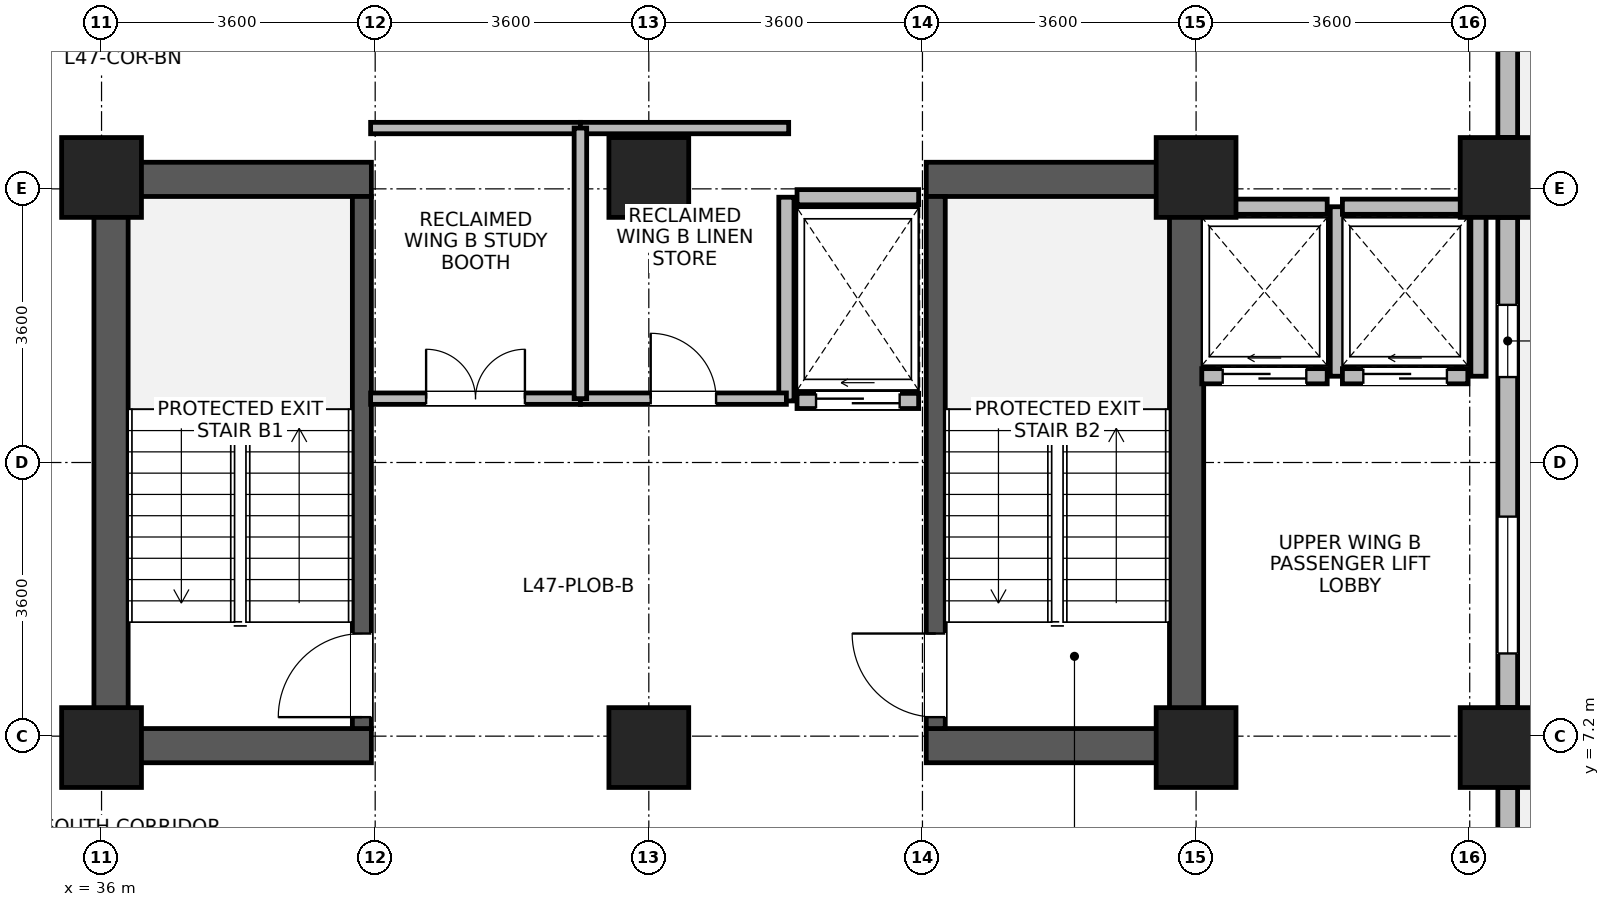
"""IFC4 building model, lengths in metres.
Left out: names, types, materials, properties, quantities, classifications, styles, units other than length and angle.
Written with IfcOpenShell. Run it as: python <this file> out.ifc"""

import sys

from ifc_helpers import new_model, si_unit, direction, frame, frame_2d, origin, origin_2d, place, context, subcontext, project, spatial, rectangle, extrude, source, transform, mapped, element, fill, save


model = new_model("IFC4")
c1 = context("Model", 3, precision=1e-05, world=origin(), true_north=direction((0.0, 1.0)))
c2 = subcontext(c1, "Body", "Model", "MODEL_VIEW")
j1 = project(units=[si_unit("LENGTHUNIT", "METRE"), si_unit("PLANEANGLEUNIT", "RADIAN")], contexts=[c1])
p1 = place(None, origin())
s1 = spatial("IfcSite", under=j1, at=p1, CompositionType="ELEMENT")
p2 = place(p1, origin())
s2 = spatial("IfcBuilding", under=s1, at=p2, CompositionType="ELEMENT")
p3 = place(p2, frame((0.0, 0.0, 184.6)))
s3 = spatial("IfcBuildingStorey", under=s2, at=p3, CompositionType="ELEMENT", Elevation=184.6)
for number, where, z_axis, x_axis in (
    (1, (36.125, 6.85, 0.0), (0.0, 0.0, 1.0), (0.0, 1.0, 0.0)),
    (2, (50.275, 6.85, 0.0), (0.0, 0.0, 1.0), (0.0, 1.0, 0.0)),
):
    element("IfcWall", number, at=place(p3, frame(where, z_axis=z_axis, x_axis=x_axis)), inside=s3, PredefinedType="SHEAR", context=c2, shape_type="SweptSolid", body=[
        extrude(rectangle(XDim=7.9, YDim=0.45, at=frame_2d((3.95, 0.0))), origin(), (0.0, 0.0, 1.0), 3.46),
    ])
for number, where, z_axis, x_axis in (
    (3, (36.35, 7.075, 0.0), (0.0, 0.0, 1.0), (1.0, 0.0, 0.0)),
    (4, (46.85, 7.075, 0.0), (0.0, 0.0, 1.0), (1.0, 0.0, 0.0)),
    (5, (36.35, 14.525, 0.0), (0.0, 0.0, 1.0), (1.0, 0.0, 0.0)),
    (6, (46.85, 14.525, 0.0), (0.0, 0.0, 1.0), (1.0, 0.0, 0.0)),
):
    element("IfcWall", number, at=place(p3, frame(where, z_axis=z_axis, x_axis=x_axis)), inside=s3, PredefinedType="SHEAR", context=c2, shape_type="SweptSolid", body=[
        extrude(rectangle(XDim=3.2, YDim=0.45, at=frame_2d((1.6, 0.0))), origin(), (0.0, 0.0, 1.0), 3.46),
    ])
p4 = place(p3, frame((39.425, 7.3, 0.0), z_axis=(0.0, 0.0, 1.0), x_axis=(0.0, 1.0, 0.0)))
e7 = element("IfcWall", 7, at=p4, inside=s3, PredefinedType="SHEAR", context=c2, shape_type="SweptSolid", body=[
    extrude(rectangle(XDim=7.0, YDim=0.25, at=frame_2d((3.5, 0.0))), origin(), (0.0, 0.0, 1.0), 3.46),
])
p5 = place(p4, frame((0.15, 0.0, 0.0)))
e8 = element("IfcOpeningElement", 8, at=p5, cuts=e7, PredefinedType="OPENING", context=c2, shape_type="SweptSolid", body=[
    extrude(rectangle(XDim=1.1, YDim=2.08, at=frame_2d((0.55, 1.04))), frame((0.0, 0.135, 0.0), z_axis=(0.0, -1.0, 0.0), x_axis=(1.0, 0.0, 0.0)), (0.0, 0.0, 1.0), 0.27),
])
p6 = place(p3, frame((46.975, 7.3, 0.0), z_axis=(0.0, 0.0, 1.0), x_axis=(0.0, 1.0, 0.0)))
e9 = element("IfcWall", 9, at=p6, inside=s3, PredefinedType="SHEAR", context=c2, shape_type="SweptSolid", body=[
    extrude(rectangle(XDim=7.0, YDim=0.25, at=frame_2d((3.5, 0.0))), origin(), (0.0, 0.0, 1.0), 3.46),
])
p7 = place(p6, frame((0.15, 0.0, 0.0)))
e10 = element("IfcOpeningElement", 10, at=p7, cuts=e9, PredefinedType="OPENING", context=c2, shape_type="SweptSolid", body=[
    extrude(rectangle(XDim=1.1, YDim=2.08, at=frame_2d((0.55, 1.04))), frame((0.0, 0.135, 0.0), z_axis=(0.0, -1.0, 0.0), x_axis=(1.0, 0.0, 0.0)), (0.0, 0.0, 1.0), 0.27),
])
m1 = source(origin(), c2, "Body", "SweptSolid", [
    extrude(rectangle(XDim=1.05, YDim=1.05, at=origin_2d()), origin(), (0.0, 0.0, 1.0), 3.7),
])
for number, where, z_axis, x_axis in (
    (11, (36.0, 7.05, 0.0), (0.0, 0.0, 1.0), (1.0, 0.0, 0.0)),
    (12, (36.0, 14.55, 0.0), (0.0, 0.0, 1.0), (1.0, 0.0, 0.0)),
    (13, (43.2, 7.05, 0.0), (0.0, 0.0, 1.0), (1.0, 0.0, 0.0)),
    (14, (43.2, 14.55, 0.0), (0.0, 0.0, 1.0), (1.0, 0.0, 0.0)),
    (15, (50.4, 7.05, 0.0), (0.0, 0.0, 1.0), (1.0, 0.0, 0.0)),
    (16, (50.4, 14.55, 0.0), (0.0, 0.0, 1.0), (1.0, 0.0, 0.0)),
    (17, (54.4, 7.05, 0.0), (0.0, 0.0, 1.0), (1.0, 0.0, 0.0)),
    (18, (54.4, 14.55, 0.0), (0.0, 0.0, 1.0), (1.0, 0.0, 0.0)),
):
    element("IfcColumn", number, at=place(p3, frame(where, z_axis=z_axis, x_axis=x_axis)), inside=s3, PredefinedType="COLUMN", context=c2, shape_type="MappedRepresentation", body=[
        mapped(m1, transform((0.0, 0.0, 0.0), x_axis=(1.0, 0.0, 0.0), y_axis=(0.0, 1.0, 0.0), z_axis=(0.0, 0.0, 1.0), scale=1.0)),
    ])
p8 = place(p3, frame((54.5, 6.524, 0.0), z_axis=(0.0, 0.0, 1.0), x_axis=(0.0, -1.0, 0.0)))
e19 = element("IfcWall", 19, at=p8, inside=s3, PredefinedType="STANDARD", context=c2, shape_type="SweptSolid", body=[
    extrude(rectangle(XDim=4.854, YDim=0.26, at=frame_2d((2.427, 0.0))), origin(), (0.0, 0.0, 1.0), 3.44),
])
p9 = place(p8, frame((2.648, 0.0, 0.0)))
e20 = element("IfcOpeningElement", 20, at=p9, cuts=e19, PredefinedType="OPENING", context=c2, shape_type="SweptSolid", body=[
    extrude(rectangle(XDim=1.5, YDim=2.15, at=frame_2d((0.75, 1.075))), frame((0.0, 0.14, 0.0), z_axis=(0.0, -1.0, 0.0), x_axis=(1.0, 0.0, 0.0)), (0.0, 0.0, 1.0), 0.28),
])
p10 = place(p3, frame((54.5, 14.024, 0.0), z_axis=(0.0, 0.0, 1.0), x_axis=(0.0, -1.0, 0.0)))
e21 = element("IfcWall", 21, at=p10, inside=s3, PredefinedType="STANDARD", context=c2, shape_type="SweptSolid", body=[
    extrude(rectangle(XDim=6.448, YDim=0.26, at=frame_2d((3.224, 0.0))), origin(), (0.0, 0.0, 1.0), 2.99),
])
p11 = place(p10, frame((3.936, 0.0, 0.85)))
e22 = element("IfcOpeningElement", 22, at=p11, cuts=e21, PredefinedType="OPENING", context=c2, shape_type="SweptSolid", body=[
    extrude(rectangle(XDim=1.8, YDim=1.85, at=frame_2d((0.9, 0.925))), frame((0.0, 0.14, 0.0), z_axis=(0.0, -1.0, 0.0), x_axis=(1.0, 0.0, 0.0)), (0.0, 0.0, 1.0), 0.28),
])
p12 = place(p10, frame((1.15, 0.0, 0.85)))
e23 = element("IfcOpeningElement", 23, at=p12, cuts=e21, PredefinedType="OPENING", context=c2, shape_type="SweptSolid", body=[
    extrude(rectangle(XDim=0.95, YDim=1.75, at=frame_2d((0.475, 0.875))), frame((0.0, 0.14, 0.0), z_axis=(0.0, -1.0, 0.0), x_axis=(1.0, 0.0, 0.0)), (0.0, 0.0, 1.0), 0.28),
])
p13 = place(p3, frame((54.5, 21.074, 0.0), z_axis=(0.0, 0.0, 1.0), x_axis=(0.0, -1.0, 0.0)))
e24 = element("IfcWall", 24, at=p13, inside=s3, PredefinedType="STANDARD", context=c2, shape_type="SweptSolid", body=[
    extrude(rectangle(XDim=5.998, YDim=0.26, at=frame_2d((2.999, 0.0))), origin(), (0.0, 0.0, 1.0), 2.99),
])
p14 = place(p13, frame((0.6, 0.0, 0.85)))
e25 = element("IfcOpeningElement", 25, at=p14, cuts=e24, PredefinedType="OPENING", context=c2, shape_type="SweptSolid", body=[
    extrude(rectangle(XDim=1.8, YDim=1.85, at=frame_2d((0.9, 0.925))), frame((0.0, 0.14, 0.0), z_axis=(0.0, -1.0, 0.0), x_axis=(1.0, 0.0, 0.0)), (0.0, 0.0, 1.0), 0.28),
])
p15 = place(p3, frame((50.475, 11.935, 0.0), z_axis=(0.0, 0.0, 1.0), x_axis=(1.0, 0.0, 0.0)))
e26 = element("IfcWall", 26, at=p15, inside=s3, PredefinedType="PARTITIONING", context=c2, shape_type="SweptSolid", body=[
    extrude(rectangle(XDim=1.65, YDim=0.2, at=frame_2d((0.825, 0.0))), origin(), (0.0, 0.0, 1.0), 3.44),
])
p16 = place(p15, frame((0.275, 0.0, 0.0)))
e27 = element("IfcOpeningElement", 27, at=p16, cuts=e26, PredefinedType="OPENING", context=c2, shape_type="SweptSolid", body=[
    extrude(rectangle(XDim=1.1, YDim=2.12, at=frame_2d((0.55, 1.06))), frame((0.0, 0.11, 0.0), z_axis=(0.0, -1.0, 0.0), x_axis=(1.0, 0.0, 0.0)), (0.0, 0.0, 1.0), 0.22),
])
p17 = place(p3, frame((50.475, 14.165, 0.0), z_axis=(0.0, 0.0, 1.0), x_axis=(1.0, 0.0, 0.0)))
e28 = element("IfcWall", 28, at=p17, inside=s3, PredefinedType="PARTITIONING", context=c2, shape_type="SweptSolid", body=[
    extrude(rectangle(XDim=1.65, YDim=0.2, at=frame_2d((0.825, 0.0))), origin(), (0.0, 0.0, 1.0), 3.44),
])
p18 = place(p3, frame((52.265, 11.935, 0.0), z_axis=(0.0, 0.0, 1.0), x_axis=(0.0, 1.0, 0.0)))
e29 = element("IfcWall", 29, at=p18, inside=s3, PredefinedType="PARTITIONING", context=c2, shape_type="SweptSolid", body=[
    extrude(rectangle(XDim=2.23, YDim=0.2, at=frame_2d((1.115, 0.0))), origin(), (0.0, 0.0, 1.0), 3.44),
])
p19 = place(p3, frame((52.325, 11.935, 0.0), z_axis=(0.0, 0.0, 1.0), x_axis=(1.0, 0.0, 0.0)))
e30 = element("IfcWall", 30, at=p19, inside=s3, PredefinedType="PARTITIONING", context=c2, shape_type="SweptSolid", body=[
    extrude(rectangle(XDim=1.65, YDim=0.2, at=frame_2d((0.825, 0.0))), origin(), (0.0, 0.0, 1.0), 3.44),
])
p20 = place(p19, frame((0.275, 0.0, 0.0)))
e31 = element("IfcOpeningElement", 31, at=p20, cuts=e30, PredefinedType="OPENING", context=c2, shape_type="SweptSolid", body=[
    extrude(rectangle(XDim=1.1, YDim=2.12, at=frame_2d((0.55, 1.06))), frame((0.0, 0.11, 0.0), z_axis=(0.0, -1.0, 0.0), x_axis=(1.0, 0.0, 0.0)), (0.0, 0.0, 1.0), 0.22),
])
p21 = place(p3, frame((52.325, 14.165, 0.0), z_axis=(0.0, 0.0, 1.0), x_axis=(1.0, 0.0, 0.0)))
e32 = element("IfcWall", 32, at=p21, inside=s3, PredefinedType="PARTITIONING", context=c2, shape_type="SweptSolid", body=[
    extrude(rectangle(XDim=1.65, YDim=0.2, at=frame_2d((0.825, 0.0))), origin(), (0.0, 0.0, 1.0), 3.44),
])
p22 = place(p3, frame((54.115, 11.935, 0.0), z_axis=(0.0, 0.0, 1.0), x_axis=(0.0, 1.0, 0.0)))
e33 = element("IfcWall", 33, at=p22, inside=s3, PredefinedType="PARTITIONING", context=c2, shape_type="SweptSolid", body=[
    extrude(rectangle(XDim=2.23, YDim=0.2, at=frame_2d((1.115, 0.0))), origin(), (0.0, 0.0, 1.0), 2.99),
])
p23 = place(p3, frame((45.15, 11.61, 0.0), z_axis=(0.0, 0.0, 1.0), x_axis=(1.0, 0.0, 0.0)))
e34 = element("IfcWall", 34, at=p23, inside=s3, PredefinedType="PARTITIONING", context=c2, shape_type="SweptSolid", body=[
    extrude(rectangle(XDim=1.6, YDim=0.2, at=frame_2d((0.8, 0.0))), origin(), (0.0, 0.0, 1.0), 3.44),
])
p24 = place(p23, frame((0.25, 0.0, 0.0)))
e35 = element("IfcOpeningElement", 35, at=p24, cuts=e34, PredefinedType="OPENING", context=c2, shape_type="SweptSolid", body=[
    extrude(rectangle(XDim=1.1, YDim=2.12, at=frame_2d((0.55, 1.06))), frame((0.0, 0.11, 0.0), z_axis=(0.0, -1.0, 0.0), x_axis=(1.0, 0.0, 0.0)), (0.0, 0.0, 1.0), 0.22),
])
p25 = place(p3, frame((45.15, 14.29, 0.0), z_axis=(0.0, 0.0, 1.0), x_axis=(1.0, 0.0, 0.0)))
e36 = element("IfcWall", 36, at=p25, inside=s3, PredefinedType="PARTITIONING", context=c2, shape_type="SweptSolid", body=[
    extrude(rectangle(XDim=1.6, YDim=0.2, at=frame_2d((0.8, 0.0))), origin(), (0.0, 0.0, 1.0), 2.44),
])
p26 = place(p3, frame((45.01, 11.61, 0.0), z_axis=(0.0, 0.0, 1.0), x_axis=(0.0, 1.0, 0.0)))
e37 = element("IfcWall", 37, at=p26, inside=s3, PredefinedType="PARTITIONING", context=c2, shape_type="SweptSolid", body=[
    extrude(rectangle(XDim=2.68, YDim=0.2, at=frame_2d((1.34, 0.0))), origin(), (0.0, 0.0, 1.0), 3.44),
])
p27 = place(p3, frame((39.54, 11.64, 0.0), z_axis=(0.0, 0.0, 1.0), x_axis=(1.0, 0.0, 0.0)))
e38 = element("IfcWall", 38, at=p27, inside=s3, PredefinedType="PARTITIONING", context=c2, shape_type="SweptSolid", body=[
    extrude(rectangle(XDim=2.76, YDim=0.15, at=frame_2d((1.38, 0.0))), origin(), (0.0, 0.0, 1.0), 3.44),
])
p28 = place(p27, frame((0.73, 0.0, 0.0)))
e39 = element("IfcOpeningElement", 39, at=p28, cuts=e38, PredefinedType="OPENING", context=c2, shape_type="SweptSolid", body=[
    extrude(rectangle(XDim=1.3, YDim=2.12, at=frame_2d((0.65, 1.06))), frame((0.0, 0.085, 0.0), z_axis=(0.0, -1.0, 0.0), x_axis=(1.0, 0.0, 0.0)), (0.0, 0.0, 1.0), 0.17),
])
p29 = place(p3, frame((39.54, 15.2, 0.0), z_axis=(0.0, 0.0, 1.0), x_axis=(1.0, 0.0, 0.0)))
e40 = element("IfcWall", 40, at=p29, inside=s3, PredefinedType="PARTITIONING", context=c2, shape_type="SweptSolid", body=[
    extrude(rectangle(XDim=2.76, YDim=0.15, at=frame_2d((1.38, 0.0))), origin(), (0.0, 0.0, 1.0), 3.44),
])
p30 = place(p3, frame((42.3, 11.64, 0.0), z_axis=(0.0, 0.0, 1.0), x_axis=(1.0, 0.0, 0.0)))
e41 = element("IfcWall", 41, at=p30, inside=s3, PredefinedType="PARTITIONING", context=c2, shape_type="SweptSolid", body=[
    extrude(rectangle(XDim=2.71, YDim=0.15, at=frame_2d((1.355, 0.0))), origin(), (0.0, 0.0, 1.0), 3.44),
])
p31 = place(p30, frame((0.925, 0.0, 0.0)))
e42 = element("IfcOpeningElement", 42, at=p31, cuts=e41, PredefinedType="OPENING", context=c2, shape_type="SweptSolid", body=[
    extrude(rectangle(XDim=0.86, YDim=2.02, at=frame_2d((0.43, 1.01))), frame((0.0, 0.085, 0.0), z_axis=(0.0, -1.0, 0.0), x_axis=(1.0, 0.0, 0.0)), (0.0, 0.0, 1.0), 0.17),
])
p32 = place(p3, frame((42.3, 15.2, 0.0), z_axis=(0.0, 0.0, 1.0), x_axis=(1.0, 0.0, 0.0)))
e43 = element("IfcWall", 43, at=p32, inside=s3, PredefinedType="PARTITIONING", context=c2, shape_type="SweptSolid", body=[
    extrude(rectangle(XDim=2.74, YDim=0.15, at=frame_2d((1.37, 0.0))), origin(), (0.0, 0.0, 1.0), 3.44),
])
p33 = place(p3, frame((42.3, 11.64, 0.0), z_axis=(0.0, 0.0, 1.0), x_axis=(0.0, 1.0, 0.0)))
e44 = element("IfcWall", 44, at=p33, inside=s3, PredefinedType="PARTITIONING", context=c2, shape_type="SweptSolid", body=[
    extrude(rectangle(XDim=3.56, YDim=0.165, at=frame_2d((1.78, 0.0))), origin(), (0.0, 0.0, 1.0), 3.44),
])
p34 = place(p11, origin())
e45 = element("IfcWindow", 45, at=p34, inside=s3, PartitioningType="SINGLE_PANEL", PredefinedType="WINDOW", context=c2, shape_type="SweptSolid", body=[
    extrude(rectangle(XDim=1.8, YDim=1.85, at=frame_2d((0.9, 0.925))), frame((0.0, 0.03, 0.0), z_axis=(0.0, -1.0, 0.0), x_axis=(1.0, 0.0, 0.0)), (0.0, 0.0, 1.0), 0.06),
])
fill(e22, e45)
p35 = place(p12, origin())
e46 = element("IfcWindow", 46, at=p35, inside=s3, PartitioningType="SINGLE_PANEL", PredefinedType="WINDOW", context=c2, shape_type="SweptSolid", body=[
    extrude(rectangle(XDim=0.95, YDim=1.75, at=frame_2d((0.475, 0.875))), frame((0.0, 0.03, 0.0), z_axis=(0.0, -1.0, 0.0), x_axis=(1.0, 0.0, 0.0)), (0.0, 0.0, 1.0), 0.06),
])
fill(e23, e46)
p36 = place(p5, origin())
e47 = element("IfcDoor", 47, at=p36, inside=s3, OperationType="SINGLE_SWING_LEFT", PredefinedType="DOOR", context=c2, shape_type="SweptSolid", body=[
    extrude(rectangle(XDim=1.1, YDim=2.08, at=frame_2d((0.55, 1.04))), frame((0.0, 0.025, 0.0), z_axis=(0.0, -1.0, 0.0), x_axis=(1.0, 0.0, 0.0)), (0.0, 0.0, 1.0), 0.05),
])
fill(e8, e47)
p37 = place(p7, origin())
e48 = element("IfcDoor", 48, at=p37, inside=s3, OperationType="SINGLE_SWING_RIGHT", PredefinedType="DOOR", context=c2, shape_type="SweptSolid", body=[
    extrude(rectangle(XDim=1.1, YDim=2.08, at=frame_2d((0.55, 1.04))), frame((0.0, 0.025, 0.0), z_axis=(0.0, -1.0, 0.0), x_axis=(1.0, 0.0, 0.0)), (0.0, 0.0, 1.0), 0.05),
])
fill(e10, e48)
p38 = place(p16, origin())
e49 = element("IfcDoor", 49, at=p38, inside=s3, OperationType="SLIDING_TO_LEFT", PredefinedType="DOOR", context=c2, shape_type="SweptSolid", body=[
    extrude(rectangle(XDim=1.1, YDim=2.12, at=frame_2d((0.55, 1.06))), frame((0.0, 0.025, 0.0), z_axis=(0.0, -1.0, 0.0), x_axis=(1.0, 0.0, 0.0)), (0.0, 0.0, 1.0), 0.05),
])
fill(e27, e49)
p39 = place(p20, origin())
e50 = element("IfcDoor", 50, at=p39, inside=s3, OperationType="SLIDING_TO_LEFT", PredefinedType="DOOR", context=c2, shape_type="SweptSolid", body=[
    extrude(rectangle(XDim=1.1, YDim=2.12, at=frame_2d((0.55, 1.06))), frame((0.0, 0.025, 0.0), z_axis=(0.0, -1.0, 0.0), x_axis=(1.0, 0.0, 0.0)), (0.0, 0.0, 1.0), 0.05),
])
fill(e31, e50)
p40 = place(p24, origin())
e51 = element("IfcDoor", 51, at=p40, inside=s3, OperationType="SLIDING_TO_LEFT", PredefinedType="DOOR", context=c2, shape_type="SweptSolid", body=[
    extrude(rectangle(XDim=1.1, YDim=2.12, at=frame_2d((0.55, 1.06))), frame((0.0, 0.025, 0.0), z_axis=(0.0, -1.0, 0.0), x_axis=(1.0, 0.0, 0.0)), (0.0, 0.0, 1.0), 0.05),
])
fill(e35, e51)
p41 = place(p28, origin())
e52 = element("IfcDoor", 52, at=p41, inside=s3, OperationType="DOUBLE_DOOR_SINGLE_SWING", PredefinedType="DOOR", context=c2, shape_type="SweptSolid", body=[
    extrude(rectangle(XDim=1.3, YDim=2.12, at=frame_2d((0.65, 1.06))), frame((0.0, 0.025, 0.0), z_axis=(0.0, -1.0, 0.0), x_axis=(1.0, 0.0, 0.0)), (0.0, 0.0, 1.0), 0.05),
])
fill(e39, e52)
p42 = place(p31, origin())
e53 = element("IfcDoor", 53, at=p42, inside=s3, OperationType="SINGLE_SWING_LEFT", PredefinedType="DOOR", context=c2, shape_type="SweptSolid", body=[
    extrude(rectangle(XDim=0.86, YDim=2.02, at=frame_2d((0.43, 1.01))), frame((0.0, 0.025, 0.0), z_axis=(0.0, -1.0, 0.0), x_axis=(1.0, 0.0, 0.0)), (0.0, 0.0, 1.0), 0.05),
])
fill(e42, e53)
save(model, sys.argv[1])
